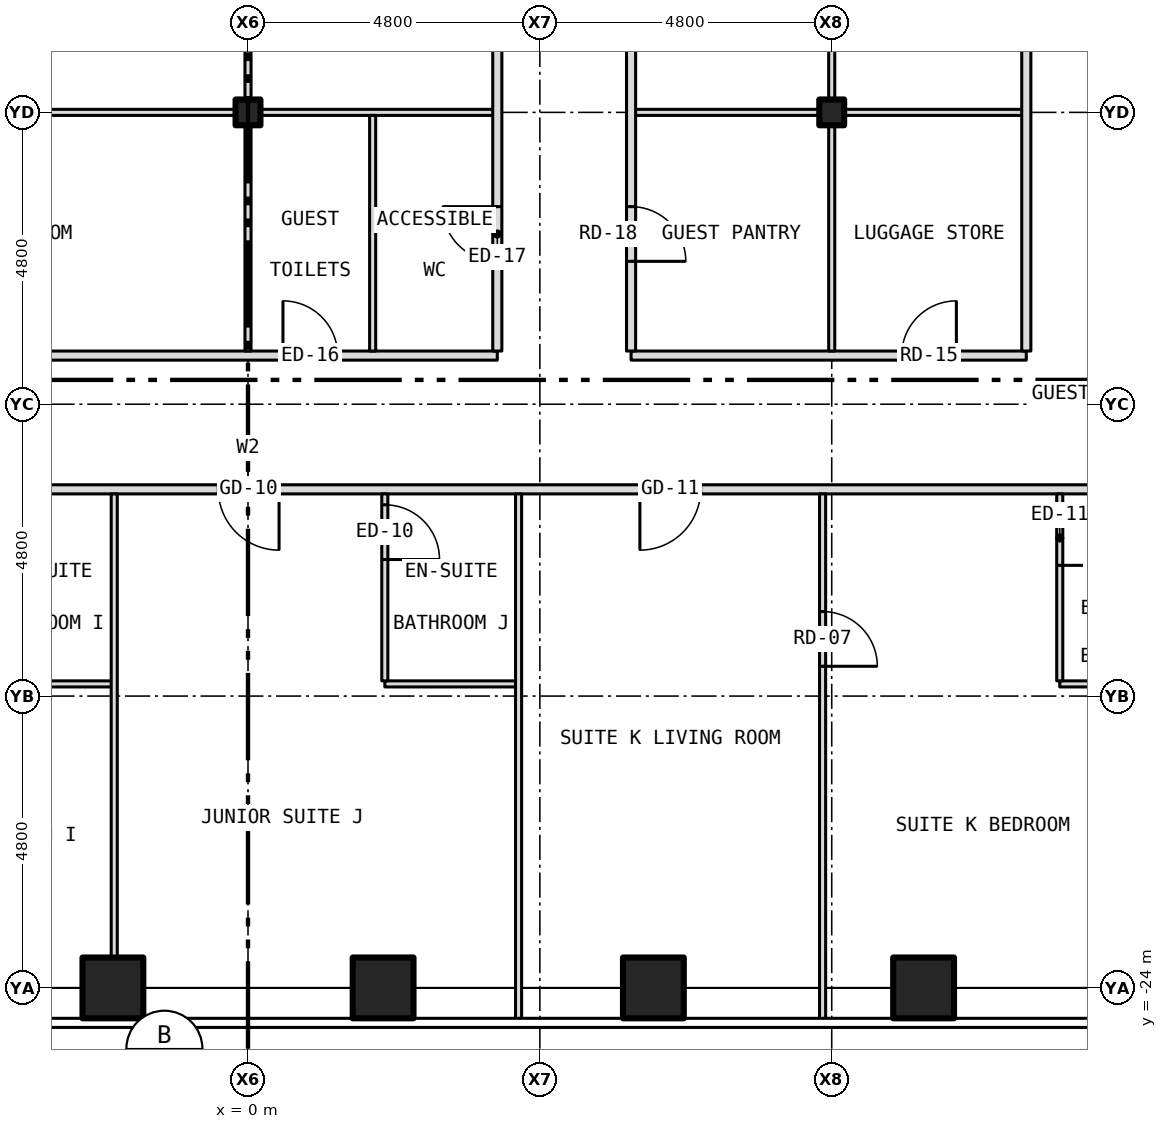
"""IFC4 building model, lengths in metres.
Left out: names, types, materials, properties, quantities, classifications, styles, units other than length and angle.
Written with IfcOpenShell. Run it as: python <this file> out.ifc"""

import sys

from ifc_helpers import new_model, si_unit, direction, frame, frame_2d, origin, origin_2d, place, context, subcontext, project, spatial, rectangle, hollow_rectangle, i_section, extrude, element, fill, save


model = new_model("IFC4")
c1 = context("Model", 3, precision=1e-05, world=origin(), true_north=direction((0.0, 1.0)))
c2 = subcontext(c1, "Body", "Model", "MODEL_VIEW")
j1 = project(units=[si_unit("LENGTHUNIT", "METRE"), si_unit("PLANEANGLEUNIT", "RADIAN")], contexts=[c1])
p1 = place(None, origin())
s1 = spatial("IfcSite", under=j1, at=p1, CompositionType="ELEMENT")
p2 = place(p1, origin())
s2 = spatial("IfcBuilding", under=s1, at=p2, CompositionType="ELEMENT")
p3 = place(p2, frame((0.0, 0.0, 53.0)))
s3 = spatial("IfcBuildingStorey", under=s2, at=p3, CompositionType="ELEMENT", Elevation=53.0)
for number, where, z_axis, x_axis in (
    (1, (-2.222, -24.0, -0.15), (0.0, 0.0, 1.0), (1.0, 0.0, 0.0)),
    (2, (2.222, -24.0, -0.15), (0.0, 0.0, 1.0), (1.0, 0.0, 0.0)),
    (3, (6.667, -24.0, -0.15), (0.0, 0.0, 1.0), (1.0, 0.0, 0.0)),
    (4, (11.111, -24.0, -0.15), (0.0, 0.0, 1.0), (1.0, 0.0, 0.0)),
):
    element("IfcColumn", number, at=place(p3, frame(where, z_axis=z_axis, x_axis=x_axis)), inside=s3, PredefinedType="COLUMN", context=c2, shape_type="SweptSolid", body=[
        extrude(hollow_rectangle(XDim=1.0, YDim=1.0, WallThickness=0.06, at=origin_2d()), origin(), (0.0, 0.0, 1.0), 3.5),
    ])
for number, where, z_axis, x_axis in (
    (5, (0.0, -9.6, -0.15), (0.0, 0.0, 1.0), (1.0, 0.0, 0.0)),
    (6, (9.6, -9.6, -0.15), (0.0, 0.0, 1.0), (1.0, 0.0, 0.0)),
):
    element("IfcColumn", number, at=place(p3, frame(where, z_axis=z_axis, x_axis=x_axis)), inside=s3, PredefinedType="COLUMN", context=c2, shape_type="SweptSolid", body=[
        extrude(i_section(OverallWidth=0.409, OverallDepth=0.424, WebThickness=0.033, FlangeThickness=0.052, at=origin_2d()), origin(), (0.0, 0.0, 1.0), 3.5),
    ])
for number, where, z_axis, x_axis in (
    (7, (-4.4, -19.0, 0.0), (0.0, 0.0, 1.0), (1.0, 0.0, 0.0)),
    (8, (2.25, -19.0, 0.0), (0.0, 0.0, 1.0), (1.0, 0.0, 0.0)),
    (9, (13.35, -19.0, 0.0), (0.0, 0.0, 1.0), (1.0, 0.0, 0.0)),
):
    element("IfcWall", number, at=place(p3, frame(where, z_axis=z_axis, x_axis=x_axis)), inside=s3, PredefinedType="PARTITIONING", context=c2, shape_type="SweptSolid", body=[
        extrude(rectangle(XDim=2.2, YDim=0.1, at=frame_2d((1.1, 0.0))), origin(), (0.0, 0.0, 1.0), 3.35),
    ])
p4 = place(p3, frame((-15.8, -15.8, 0.0), z_axis=(0.0, 0.0, 1.0), x_axis=(1.0, 0.0, 0.0)))
e10 = element("IfcWall", 10, at=p4, inside=s3, PredefinedType="PARTITIONING", context=c2, shape_type="SweptSolid", body=[
    extrude(rectangle(XDim=31.6, YDim=0.15, at=frame_2d((15.8, 0.0))), origin(), (0.0, 0.0, 1.0), 3.35),
])
p5 = place(p4, frame((3.067, 0.0, 0.0)))
e11 = element("IfcOpeningElement", 11, at=p5, cuts=e10, PredefinedType="OPENING", context=c2, shape_type="SweptSolid", body=[
    extrude(rectangle(XDim=1.0, YDim=2.1, at=frame_2d((0.5, 1.05))), frame((0.0, 0.087, 0.0), z_axis=(0.0, -1.0, 0.0), x_axis=(1.0, 0.0, 0.0)), (0.0, 0.0, 1.0), 0.174),
])
p6 = place(p4, frame((5.311, 0.0, 0.0)))
e12 = element("IfcOpeningElement", 12, at=p6, cuts=e10, PredefinedType="OPENING", context=c2, shape_type="SweptSolid", body=[
    extrude(rectangle(XDim=1.0, YDim=2.1, at=frame_2d((0.5, 1.05))), frame((0.0, 0.087, 0.0), z_axis=(0.0, -1.0, 0.0), x_axis=(1.0, 0.0, 0.0)), (0.0, 0.0, 1.0), 0.174),
])
p7 = place(p4, frame((9.756, 0.0, 0.0)))
e13 = element("IfcOpeningElement", 13, at=p7, cuts=e10, PredefinedType="OPENING", context=c2, shape_type="SweptSolid", body=[
    extrude(rectangle(XDim=1.0, YDim=2.1, at=frame_2d((0.5, 1.05))), frame((0.0, 0.087, 0.0), z_axis=(0.0, -1.0, 0.0), x_axis=(1.0, 0.0, 0.0)), (0.0, 0.0, 1.0), 0.174),
])
p8 = place(p4, frame((15.311, 0.0, 0.0)))
e14 = element("IfcOpeningElement", 14, at=p8, cuts=e10, PredefinedType="OPENING", context=c2, shape_type="SweptSolid", body=[
    extrude(rectangle(XDim=1.0, YDim=2.1, at=frame_2d((0.5, 1.05))), frame((0.0, 0.087, 0.0), z_axis=(0.0, -1.0, 0.0), x_axis=(1.0, 0.0, 0.0)), (0.0, 0.0, 1.0), 0.174),
])
p9 = place(p4, frame((22.245, 0.0, 0.0)))
e15 = element("IfcOpeningElement", 15, at=p9, cuts=e10, PredefinedType="OPENING", context=c2, shape_type="SweptSolid", body=[
    extrude(rectangle(XDim=1.0, YDim=2.1, at=frame_2d((0.5, 1.05))), frame((0.0, 0.087, 0.0), z_axis=(0.0, -1.0, 0.0), x_axis=(1.0, 0.0, 0.0)), (0.0, 0.0, 1.0), 0.174),
])
p10 = place(p3, frame((-12.8, -13.6, 0.0), z_axis=(0.0, 0.0, 1.0), x_axis=(1.0, 0.0, 0.0)))
e16 = element("IfcWall", 16, at=p10, inside=s3, PredefinedType="PARTITIONING", context=c2, shape_type="SweptSolid", body=[
    extrude(rectangle(XDim=16.9, YDim=0.15, at=frame_2d((8.45, 0.0))), origin(), (0.0, 0.0, 1.0), 3.35),
])
p11 = place(p10, frame((1.15, 0.0, 0.0)))
e17 = element("IfcOpeningElement", 17, at=p11, cuts=e16, PredefinedType="OPENING", context=c2, shape_type="SweptSolid", body=[
    extrude(rectangle(XDim=0.9, YDim=2.1, at=frame_2d((0.45, 1.05))), frame((0.0, 0.087, 0.0), z_axis=(0.0, -1.0, 0.0), x_axis=(1.0, 0.0, 0.0)), (0.0, 0.0, 1.0), 0.174),
])
p12 = place(p10, frame((13.375, 0.0, 0.0)))
e18 = element("IfcOpeningElement", 18, at=p12, cuts=e16, PredefinedType="OPENING", context=c2, shape_type="SweptSolid", body=[
    extrude(rectangle(XDim=0.9, YDim=2.1, at=frame_2d((0.45, 1.05))), frame((0.0, 0.087, 0.0), z_axis=(0.0, -1.0, 0.0), x_axis=(1.0, 0.0, 0.0)), (0.0, 0.0, 1.0), 0.174),
])
p13 = place(p10, frame((7.55, 0.0, 0.0)))
e19 = element("IfcOpeningElement", 19, at=p13, cuts=e16, PredefinedType="OPENING", context=c2, shape_type="SweptSolid", body=[
    extrude(rectangle(XDim=0.9, YDim=2.1, at=frame_2d((0.45, 1.05))), frame((0.0, 0.087, 0.0), z_axis=(0.0, -1.0, 0.0), x_axis=(1.0, 0.0, 0.0)), (0.0, 0.0, 1.0), 0.174),
])
p14 = place(p3, frame((6.3, -13.6, 0.0), z_axis=(0.0, 0.0, 1.0), x_axis=(1.0, 0.0, 0.0)))
e20 = element("IfcWall", 20, at=p14, inside=s3, PredefinedType="PARTITIONING", context=c2, shape_type="SweptSolid", body=[
    extrude(rectangle(XDim=6.5, YDim=0.15, at=frame_2d((3.25, 0.0))), origin(), (0.0, 0.0, 1.0), 3.35),
])
p15 = place(p14, frame((4.45, 0.0, 0.0)))
e21 = element("IfcOpeningElement", 21, at=p15, cuts=e20, PredefinedType="OPENING", context=c2, shape_type="SweptSolid", body=[
    extrude(rectangle(XDim=0.9, YDim=2.1, at=frame_2d((0.45, 1.05))), frame((0.0, 0.087, 0.0), z_axis=(0.0, -1.0, 0.0), x_axis=(1.0, 0.0, 0.0)), (0.0, 0.0, 1.0), 0.174),
])
p16 = place(p3, frame((-9.396, -9.6, 0.0), z_axis=(0.0, 0.0, 1.0), x_axis=(1.0, 0.0, 0.0)))
e22 = element("IfcWall", 22, at=p16, inside=s3, PredefinedType="PARTITIONING", context=c2, shape_type="SweptSolid", body=[
    extrude(rectangle(XDim=9.192, YDim=0.1, at=frame_2d((4.596, 0.0))), origin(), (0.0, 0.0, 1.0), 2.728),
])
p17 = place(p3, frame((-0.204, -9.6, 0.0), z_axis=(0.0, 0.0, 1.0), x_axis=(1.0, 0.0, 0.0)))
e23 = element("IfcWall", 23, at=p17, inside=s3, PredefinedType="PARTITIONING", context=c2, shape_type="SweptSolid", body=[
    extrude(rectangle(XDim=0.408, YDim=0.1, at=frame_2d((0.204, 0.0))), origin(), (0.0, 0.0, 1.0), 3.35),
])
p18 = place(p3, frame((0.204, -9.6, 0.0), z_axis=(0.0, 0.0, 1.0), x_axis=(1.0, 0.0, 0.0)))
e24 = element("IfcWall", 24, at=p18, inside=s3, PredefinedType="PARTITIONING", context=c2, shape_type="SweptSolid", body=[
    extrude(rectangle(XDim=3.896, YDim=0.1, at=frame_2d((1.948, 0.0))), origin(), (0.0, 0.0, 1.0), 2.728),
])
p19 = place(p3, frame((6.3, -9.6, 0.0), z_axis=(0.0, 0.0, 1.0), x_axis=(1.0, 0.0, 0.0)))
e25 = element("IfcWall", 25, at=p19, inside=s3, PredefinedType="PARTITIONING", context=c2, shape_type="SweptSolid", body=[
    extrude(rectangle(XDim=3.096, YDim=0.1, at=frame_2d((1.548, 0.0))), origin(), (0.0, 0.0, 1.0), 2.728),
])
p20 = place(p3, frame((9.396, -9.6, 0.0), z_axis=(0.0, 0.0, 1.0), x_axis=(1.0, 0.0, 0.0)))
e26 = element("IfcWall", 26, at=p20, inside=s3, PredefinedType="PARTITIONING", context=c2, shape_type="SweptSolid", body=[
    extrude(rectangle(XDim=0.408, YDim=0.1, at=frame_2d((0.204, 0.0))), origin(), (0.0, 0.0, 1.0), 3.35),
])
p21 = place(p3, frame((9.804, -9.6, 0.0), z_axis=(0.0, 0.0, 1.0), x_axis=(1.0, 0.0, 0.0)))
e27 = element("IfcWall", 27, at=p21, inside=s3, PredefinedType="PARTITIONING", context=c2, shape_type="SweptSolid", body=[
    extrude(rectangle(XDim=2.996, YDim=0.1, at=frame_2d((1.498, 0.0))), origin(), (0.0, 0.0, 1.0), 2.728),
])
p22 = place(p3, frame((-2.2, -23.88, 0.0), z_axis=(0.0, 0.0, 1.0), x_axis=(0.0, 1.0, 0.0)))
e28 = element("IfcWall", 28, at=p22, inside=s3, PredefinedType="PARTITIONING", context=c2, shape_type="SweptSolid", body=[
    extrude(rectangle(XDim=8.005, YDim=0.1, at=frame_2d((4.002, 0.0))), origin(), (0.0, 0.0, 1.0), 3.35),
])
p23 = place(p3, frame((0.0, -13.525, 0.0), z_axis=(0.0, 0.0, 1.0), x_axis=(0.0, 1.0, 0.0)))
e29 = element("IfcWall", 29, at=p23, inside=s3, PredefinedType="PARTITIONING", context=c2, shape_type="SweptSolid", body=[
    extrude(rectangle(XDim=3.875, YDim=0.1, at=frame_2d((1.938, 0.0))), origin(), (0.0, 0.0, 1.0), 2.728),
])
p24 = place(p3, frame((0.0, -9.55, 0.0), z_axis=(0.0, 0.0, 1.0), x_axis=(0.0, 1.0, 0.0)))
e30 = element("IfcWall", 30, at=p24, inside=s3, PredefinedType="PARTITIONING", context=c2, shape_type="SweptSolid", body=[
    extrude(rectangle(XDim=9.5, YDim=0.1, at=frame_2d((4.75, 0.0))), origin(), (0.0, 0.0, 1.0), 2.728),
])
p25 = place(p3, frame((2.05, -13.525, 0.0), z_axis=(0.0, 0.0, 1.0), x_axis=(0.0, 1.0, 0.0)))
e31 = element("IfcWall", 31, at=p25, inside=s3, PredefinedType="PARTITIONING", context=c2, shape_type="SweptSolid", body=[
    extrude(rectangle(XDim=3.875, YDim=0.1, at=frame_2d((1.938, 0.0))), origin(), (0.0, 0.0, 1.0), 3.35),
])
p26 = place(p3, frame((2.25, -18.95, 0.0), z_axis=(0.0, 0.0, 1.0), x_axis=(0.0, 1.0, 0.0)))
e32 = element("IfcWall", 32, at=p26, inside=s3, PredefinedType="PARTITIONING", context=c2, shape_type="SweptSolid", body=[
    extrude(rectangle(XDim=3.075, YDim=0.1, at=frame_2d((1.538, 0.0))), origin(), (0.0, 0.0, 1.0), 3.35),
])
p27 = place(p26, frame((1.996, 0.0, 0.0)))
e33 = element("IfcOpeningElement", 33, at=p27, cuts=e32, PredefinedType="OPENING", context=c2, shape_type="SweptSolid", body=[
    extrude(rectangle(XDim=0.9, YDim=2.1, at=frame_2d((0.45, 1.05))), frame((0.0, 0.062, 0.0), z_axis=(0.0, -1.0, 0.0), x_axis=(1.0, 0.0, 0.0)), (0.0, 0.0, 1.0), 0.124),
])
p28 = place(p3, frame((4.1, -13.525, 0.0), z_axis=(0.0, 0.0, 1.0), x_axis=(0.0, 1.0, 0.0)))
e34 = element("IfcWall", 34, at=p28, inside=s3, PredefinedType="PARTITIONING", context=c2, shape_type="SweptSolid", body=[
    extrude(rectangle(XDim=17.55, YDim=0.15, at=frame_2d((8.775, 0.0))), origin(), (0.0, 0.0, 1.0), 3.35),
])
p29 = place(p28, frame((1.475, 0.0, 0.0)))
e35 = element("IfcOpeningElement", 35, at=p29, cuts=e34, PredefinedType="OPENING", context=c2, shape_type="SweptSolid", body=[
    extrude(rectangle(XDim=0.9, YDim=2.1, at=frame_2d((0.45, 1.05))), frame((0.0, 0.087, 0.0), z_axis=(0.0, -1.0, 0.0), x_axis=(1.0, 0.0, 0.0)), (0.0, 0.0, 1.0), 0.174),
])
p30 = place(p28, frame((8.275, 0.0, 0.0)))
e36 = element("IfcOpeningElement", 36, at=p30, cuts=e34, PredefinedType="OPENING", context=c2, shape_type="SweptSolid", body=[
    extrude(rectangle(XDim=0.9, YDim=2.1, at=frame_2d((0.45, 1.05))), frame((0.0, 0.087, 0.0), z_axis=(0.0, -1.0, 0.0), x_axis=(1.0, 0.0, 0.0)), (0.0, 0.0, 1.0), 0.174),
])
p31 = place(p3, frame((4.45, -24.53, 0.0), z_axis=(0.0, 0.0, 1.0), x_axis=(0.0, 1.0, 0.0)))
e37 = element("IfcWall", 37, at=p31, inside=s3, PredefinedType="PARTITIONING", context=c2, shape_type="SweptSolid", body=[
    extrude(rectangle(XDim=8.655, YDim=0.1, at=frame_2d((4.328, 0.0))), origin(), (0.0, 0.0, 1.0), 3.35),
])
p32 = place(p3, frame((6.3, -13.525, 0.0), z_axis=(0.0, 0.0, 1.0), x_axis=(0.0, 1.0, 0.0)))
e38 = element("IfcWall", 38, at=p32, inside=s3, PredefinedType="PARTITIONING", context=c2, shape_type="SweptSolid", body=[
    extrude(rectangle(XDim=17.55, YDim=0.15, at=frame_2d((8.775, 0.0))), origin(), (0.0, 0.0, 1.0), 3.35),
])
p33 = place(p32, frame((1.475, 0.0, 0.0)))
e39 = element("IfcOpeningElement", 39, at=p33, cuts=e38, PredefinedType="OPENING", context=c2, shape_type="SweptSolid", body=[
    extrude(rectangle(XDim=0.9, YDim=2.1, at=frame_2d((0.45, 1.05))), frame((0.0, 0.087, 0.0), z_axis=(0.0, -1.0, 0.0), x_axis=(1.0, 0.0, 0.0)), (0.0, 0.0, 1.0), 0.174),
])
p34 = place(p32, frame((15.125, 0.0, 0.0)))
e40 = element("IfcOpeningElement", 40, at=p34, cuts=e38, PredefinedType="OPENING", context=c2, shape_type="SweptSolid", body=[
    extrude(rectangle(XDim=0.9, YDim=2.1, at=frame_2d((0.45, 1.05))), frame((0.0, 0.087, 0.0), z_axis=(0.0, -1.0, 0.0), x_axis=(1.0, 0.0, 0.0)), (0.0, 0.0, 1.0), 0.174),
])
p35 = place(p32, frame((8.275, 0.0, 0.0)))
e41 = element("IfcOpeningElement", 41, at=p35, cuts=e38, PredefinedType="OPENING", context=c2, shape_type="SweptSolid", body=[
    extrude(rectangle(XDim=0.9, YDim=2.1, at=frame_2d((0.45, 1.05))), frame((0.0, 0.087, 0.0), z_axis=(0.0, -1.0, 0.0), x_axis=(1.0, 0.0, 0.0)), (0.0, 0.0, 1.0), 0.174),
])
p36 = place(p3, frame((9.45, -24.53, 0.0), z_axis=(0.0, 0.0, 1.0), x_axis=(0.0, 1.0, 0.0)))
e42 = element("IfcWall", 42, at=p36, inside=s3, PredefinedType="PARTITIONING", context=c2, shape_type="SweptSolid", body=[
    extrude(rectangle(XDim=8.655, YDim=0.1, at=frame_2d((4.328, 0.0))), origin(), (0.0, 0.0, 1.0), 2.728),
])
p37 = place(p36, frame((5.82, 0.0, 0.0)))
e43 = element("IfcOpeningElement", 43, at=p37, cuts=e42, PredefinedType="OPENING", context=c2, shape_type="SweptSolid", body=[
    extrude(rectangle(XDim=0.9, YDim=2.1, at=frame_2d((0.45, 1.05))), frame((0.0, 0.062, 0.0), z_axis=(0.0, -1.0, 0.0), x_axis=(1.0, 0.0, 0.0)), (0.0, 0.0, 1.0), 0.124),
])
p38 = place(p3, frame((9.6, -13.525, 0.0), z_axis=(0.0, 0.0, 1.0), x_axis=(0.0, 1.0, 0.0)))
e44 = element("IfcWall", 44, at=p38, inside=s3, PredefinedType="PARTITIONING", context=c2, shape_type="SweptSolid", body=[
    extrude(rectangle(XDim=3.875, YDim=0.1, at=frame_2d((1.938, 0.0))), origin(), (0.0, 0.0, 1.0), 2.728),
])
p39 = place(p3, frame((9.6, -9.55, 0.0), z_axis=(0.0, 0.0, 1.0), x_axis=(0.0, 1.0, 0.0)))
e45 = element("IfcWall", 45, at=p39, inside=s3, PredefinedType="PARTITIONING", context=c2, shape_type="SweptSolid", body=[
    extrude(rectangle(XDim=9.5, YDim=0.1, at=frame_2d((4.75, 0.0))), origin(), (0.0, 0.0, 1.0), 2.728),
])
p40 = place(p3, frame((12.8, -13.525, 0.0), z_axis=(0.0, 0.0, 1.0), x_axis=(0.0, 1.0, 0.0)))
e46 = element("IfcWall", 46, at=p40, inside=s3, PredefinedType="PARTITIONING", context=c2, shape_type="SweptSolid", body=[
    extrude(rectangle(XDim=11.525, YDim=0.15, at=frame_2d((5.762, 0.0))), origin(), (0.0, 0.0, 1.0), 3.35),
])
p41 = place(p40, frame((7.325, 0.0, 0.0)))
e47 = element("IfcOpeningElement", 47, at=p41, cuts=e46, PredefinedType="OPENING", context=c2, shape_type="SweptSolid", body=[
    extrude(rectangle(XDim=0.9, YDim=2.1, at=frame_2d((0.45, 1.05))), frame((0.0, 0.087, 0.0), z_axis=(0.0, -1.0, 0.0), x_axis=(1.0, 0.0, 0.0)), (0.0, 0.0, 1.0), 0.174),
])
p42 = place(p3, frame((13.35, -18.95, 0.0), z_axis=(0.0, 0.0, 1.0), x_axis=(0.0, 1.0, 0.0)))
e48 = element("IfcWall", 48, at=p42, inside=s3, PredefinedType="PARTITIONING", context=c2, shape_type="SweptSolid", body=[
    extrude(rectangle(XDim=3.075, YDim=0.1, at=frame_2d((1.538, 0.0))), origin(), (0.0, 0.0, 1.0), 3.35),
])
p43 = place(p42, frame((1.9, 0.0, 0.0)))
e49 = element("IfcOpeningElement", 49, at=p43, cuts=e48, PredefinedType="OPENING", context=c2, shape_type="SweptSolid", body=[
    extrude(rectangle(XDim=0.9, YDim=2.1, at=frame_2d((0.45, 1.05))), frame((0.0, 0.062, 0.0), z_axis=(0.0, -1.0, 0.0), x_axis=(1.0, 0.0, 0.0)), (0.0, 0.0, 1.0), 0.124),
])
p44 = place(p8, origin())
e50 = element("IfcDoor", 50, at=p44, inside=s3, OperationType="SINGLE_SWING_RIGHT", PredefinedType="DOOR", context=c2, shape_type="SweptSolid", body=[
    extrude(rectangle(XDim=1.0, YDim=2.1, at=frame_2d((0.5, 1.05))), frame((0.0, 0.025, 0.0), z_axis=(0.0, -1.0, 0.0), x_axis=(1.0, 0.0, 0.0)), (0.0, 0.0, 1.0), 0.05),
])
fill(e14, e50)
p45 = place(p27, origin())
e51 = element("IfcDoor", 51, at=p45, inside=s3, OperationType="SINGLE_SWING_LEFT", PredefinedType="DOOR", context=c2, shape_type="SweptSolid", body=[
    extrude(rectangle(XDim=0.9, YDim=2.1, at=frame_2d((0.45, 1.05))), frame((0.0, 0.025, 0.0), z_axis=(0.0, -1.0, 0.0), x_axis=(1.0, 0.0, 0.0)), (0.0, 0.0, 1.0), 0.05),
])
fill(e33, e51)
p46 = place(p9, origin())
e52 = element("IfcDoor", 52, at=p46, inside=s3, OperationType="SINGLE_SWING_LEFT", PredefinedType="DOOR", context=c2, shape_type="SweptSolid", body=[
    extrude(rectangle(XDim=1.0, YDim=2.1, at=frame_2d((0.5, 1.05))), frame((0.0, 0.025, 0.0), z_axis=(0.0, -1.0, 0.0), x_axis=(1.0, 0.0, 0.0)), (0.0, 0.0, 1.0), 0.05),
])
fill(e15, e52)
p47 = place(p37, origin())
e53 = element("IfcDoor", 53, at=p47, inside=s3, OperationType="SINGLE_SWING_LEFT", PredefinedType="DOOR", context=c2, shape_type="SweptSolid", body=[
    extrude(rectangle(XDim=0.9, YDim=2.1, at=frame_2d((0.45, 1.05))), frame((0.0, 0.025, 0.0), z_axis=(0.0, -1.0, 0.0), x_axis=(1.0, 0.0, 0.0)), (0.0, 0.0, 1.0), 0.05),
])
fill(e43, e53)
p48 = place(p43, origin())
e54 = element("IfcDoor", 54, at=p48, inside=s3, OperationType="SINGLE_SWING_LEFT", PredefinedType="DOOR", context=c2, shape_type="SweptSolid", body=[
    extrude(rectangle(XDim=0.9, YDim=2.1, at=frame_2d((0.45, 1.05))), frame((0.0, 0.025, 0.0), z_axis=(0.0, -1.0, 0.0), x_axis=(1.0, 0.0, 0.0)), (0.0, 0.0, 1.0), 0.05),
])
fill(e49, e54)
p49 = place(p15, origin())
e55 = element("IfcDoor", 55, at=p49, inside=s3, OperationType="SINGLE_SWING_RIGHT", PredefinedType="DOOR", context=c2, shape_type="SweptSolid", body=[
    extrude(rectangle(XDim=0.9, YDim=2.1, at=frame_2d((0.45, 1.05))), frame((0.0, 0.025, 0.0), z_axis=(0.0, -1.0, 0.0), x_axis=(1.0, 0.0, 0.0)), (0.0, 0.0, 1.0), 0.05),
])
fill(e21, e55)
p50 = place(p33, origin())
e56 = element("IfcDoor", 56, at=p50, inside=s3, OperationType="SINGLE_SWING_LEFT", PredefinedType="DOOR", context=c2, shape_type="SweptSolid", body=[
    extrude(rectangle(XDim=0.9, YDim=2.1, at=frame_2d((0.45, 1.05))), frame((0.0, 0.025, 0.0), z_axis=(0.0, -1.0, 0.0), x_axis=(1.0, 0.0, 0.0)), (0.0, 0.0, 1.0), 0.05),
])
fill(e39, e56)
p51 = place(p12, origin())
e57 = element("IfcDoor", 57, at=p51, inside=s3, OperationType="SINGLE_SWING_LEFT", PredefinedType="DOOR", context=c2, shape_type="SweptSolid", body=[
    extrude(rectangle(XDim=0.9, YDim=2.1, at=frame_2d((0.45, 1.05))), frame((0.0, 0.025, 0.0), z_axis=(0.0, -1.0, 0.0), x_axis=(1.0, 0.0, 0.0)), (0.0, 0.0, 1.0), 0.05),
])
fill(e18, e57)
p52 = place(p29, origin())
e58 = element("IfcDoor", 58, at=p52, inside=s3, OperationType="SINGLE_SWING_RIGHT", PredefinedType="DOOR", context=c2, shape_type="SweptSolid", body=[
    extrude(rectangle(XDim=0.9, YDim=2.1, at=frame_2d((0.45, 1.05))), frame((0.0, 0.025, 0.0), z_axis=(0.0, -1.0, 0.0), x_axis=(1.0, 0.0, 0.0)), (0.0, 0.0, 1.0), 0.05),
])
fill(e35, e58)
save(model, sys.argv[1])
